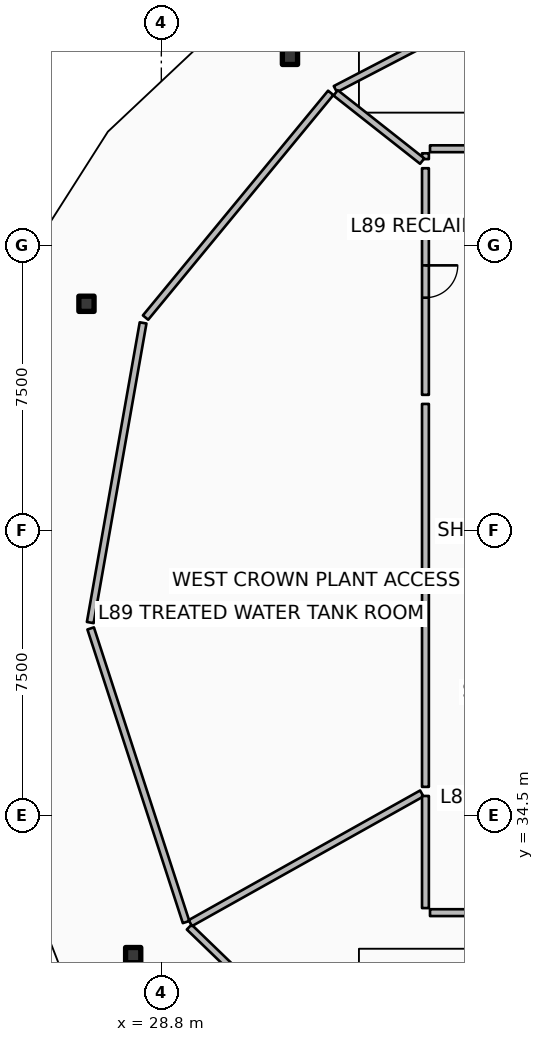
"""IFC4 building model, lengths in metres.
Left out: names, types, materials, properties, quantities, classifications, styles, units other than length and angle.
Written with IfcOpenShell. Run it as: python <this file> out.ifc"""

import sys

from ifc_helpers import new_model, si_unit, direction, frame, frame_2d, origin, origin_2d, place, context, subcontext, project, spatial, rectangle, hollow_rectangle, extrude, element, fill, save


model = new_model("IFC4")
c1 = context("Model", 3, precision=1e-05, world=origin(), true_north=direction((0.0, 1.0)))
c2 = subcontext(c1, "Body", "Model", "MODEL_VIEW")
j1 = project(units=[si_unit("LENGTHUNIT", "METRE"), si_unit("PLANEANGLEUNIT", "RADIAN")], contexts=[c1])
p1 = place(None, origin())
s1 = spatial("IfcSite", under=j1, at=p1, CompositionType="ELEMENT")
p2 = place(p1, origin())
s2 = spatial("IfcBuilding", under=s1, at=p2, CompositionType="ELEMENT")
p3 = place(p2, frame((0.0, 0.0, 356.0)))
s3 = spatial("IfcBuildingStorey", under=s2, at=p3, CompositionType="ELEMENT", Elevation=356.0)
for number, where, z_axis, x_axis in (
    (1, (32.185, 54.468, 0.0), (0.0, 0.0, 1.0), (1.0, 0.0, 0.0)),
    (2, (26.83, 47.97, 0.0), (0.0, 0.0, 1.0), (1.0, 0.0, 0.0)),
    (3, (28.059, 30.833, 0.0), (0.0, 0.0, 1.0), (1.0, 0.0, 0.0)),
):
    element("IfcColumn", number, at=place(p3, frame(where, z_axis=z_axis, x_axis=x_axis)), inside=s3, PredefinedType="COLUMN", context=c2, shape_type="SweptSolid", body=[
        extrude(hollow_rectangle(XDim=0.4, YDim=0.4, WallThickness=0.02, InnerFilletRadius=0.02, OuterFilletRadius=0.04, at=origin_2d()), origin(), (0.0, 0.0, 1.0), 3.32),
    ])
p4 = place(p3, frame((39.59, 56.853, 0.0), z_axis=(0.0, 0.0, 1.0), x_axis=(-0.886949494865, -0.461866423935, 0.0)))
e4 = element("IfcWall", 4, at=p4, inside=s3, PredefinedType="PARTITIONING", context=c2, shape_type="SweptSolid", body=[
    extrude(rectangle(XDim=7.002, YDim=0.18, at=frame_2d((3.501, 0.0))), origin(), (0.0, 0.0, 1.0), 2.76),
])
p5 = place(p3, frame((33.258, 53.52, 0.0), z_axis=(0.0, 0.0, 1.0), x_axis=(-0.636018833443, -0.771673534278, 0.0)))
e5 = element("IfcWall", 5, at=p5, inside=s3, PredefinedType="PARTITIONING", context=c2, shape_type="SweptSolid", body=[
    extrude(rectangle(XDim=7.661, YDim=0.18, at=frame_2d((3.831, 0.0))), origin(), (0.0, 0.0, 1.0), 2.76),
])
p6 = place(p3, frame((28.32, 47.468, 0.0), z_axis=(0.0, 0.0, 1.0), x_axis=(-0.173668776466, -0.984804120666, 0.0)))
e6 = element("IfcWall", 6, at=p6, inside=s3, PredefinedType="PARTITIONING", context=c2, shape_type="SweptSolid", body=[
    extrude(rectangle(XDim=8.006, YDim=0.18, at=frame_2d((4.003, 0.0))), origin(), (0.0, 0.0, 1.0), 2.76),
])
p7 = place(p3, frame((26.941, 39.428, 0.0), z_axis=(0.0, 0.0, 1.0), x_axis=(0.309024234991, -0.951054163646, 0.0)))
e7 = element("IfcWall", 7, at=p7, inside=s3, PredefinedType="PARTITIONING", context=c2, shape_type="SweptSolid", body=[
    extrude(rectangle(XDim=8.124, YDim=0.18, at=frame_2d((4.062, 0.0))), origin(), (0.0, 0.0, 1.0), 2.76),
])
p8 = place(p3, frame((29.533, 31.57, 0.0), z_axis=(0.0, 0.0, 1.0), x_axis=(0.719364153135, -0.694633151516, 0.0)))
e8 = element("IfcWall", 8, at=p8, inside=s3, PredefinedType="PARTITIONING", context=c2, shape_type="SweptSolid", body=[
    extrude(rectangle(XDim=8.006, YDim=0.18, at=frame_2d((4.003, 0.0))), origin(), (0.0, 0.0, 1.0), 2.76),
])
p9 = place(p3, frame((42.252, 52.05, 0.0), z_axis=(0.0, 0.0, 1.0), x_axis=(-1.0, 0.0, 0.0)))
e9 = element("IfcWall", 9, at=p9, inside=s3, PredefinedType="PARTITIONING", context=c2, shape_type="SweptSolid", body=[
    extrude(rectangle(XDim=6.382, YDim=0.18, at=frame_2d((3.191, 0.0))), origin(), (0.0, 0.0, 1.0), 2.76),
])
p10 = place(p9, frame((2.666, 0.0, 0.0)))
e10 = element("IfcOpeningElement", 10, at=p10, cuts=e9, PredefinedType="OPENING", context=c2, shape_type="SweptSolid", body=[
    extrude(rectangle(XDim=1.05, YDim=2.1, at=frame_2d((0.525, 1.05))), frame((0.0, 0.1, 0.0), z_axis=(0.0, -1.0, 0.0), x_axis=(1.0, 0.0, 0.0)), (0.0, 0.0, 1.0), 0.2),
])
p11 = place(p3, frame((35.75, 51.93, 0.0), z_axis=(0.0, 0.0, 1.0), x_axis=(0.0, -1.0, 0.0)))
e11 = element("IfcWall", 11, at=p11, inside=s3, PredefinedType="PARTITIONING", context=c2, shape_type="SweptSolid", body=[
    extrude(rectangle(XDim=0.153, YDim=0.18, at=frame_2d((0.076, 0.0))), origin(), (0.0, 0.0, 1.0), 2.76),
])
p12 = place(p3, frame((35.664, 51.725, 0.0), z_axis=(0.0, 0.0, 1.0), x_axis=(-0.78528570066, 0.619133562601, 0.0)))
e12 = element("IfcWall", 12, at=p12, inside=s3, PredefinedType="PARTITIONING", context=c2, shape_type="SweptSolid", body=[
    extrude(rectangle(XDim=2.899, YDim=0.18, at=frame_2d((1.45, 0.0))), origin(), (0.0, 0.0, 1.0), 2.76),
])
p13 = place(p3, frame((35.75, 51.537, 0.0), z_axis=(0.0, 0.0, 1.0), x_axis=(0.0, -1.0, 0.0)))
e13 = element("IfcWall", 13, at=p13, inside=s3, PredefinedType="PARTITIONING", context=c2, shape_type="SweptSolid", body=[
    extrude(rectangle(XDim=5.962, YDim=0.18, at=frame_2d((2.981, 0.0))), origin(), (0.0, 0.0, 1.0), 2.76),
])
p14 = place(p13, frame((2.556, 0.0, 0.0)))
e14 = element("IfcOpeningElement", 14, at=p14, cuts=e13, PredefinedType="OPENING", context=c2, shape_type="SweptSolid", body=[
    extrude(rectangle(XDim=0.85, YDim=2.06, at=frame_2d((0.425, 1.03))), frame((0.0, 0.1, 0.0), z_axis=(0.0, -1.0, 0.0), x_axis=(1.0, 0.0, 0.0)), (0.0, 0.0, 1.0), 0.2),
])
p15 = place(p3, frame((35.75, 45.335, 0.0), z_axis=(0.0, 0.0, 1.0), x_axis=(0.0, -1.0, 0.0)))
e15 = element("IfcWall", 15, at=p15, inside=s3, PredefinedType="PARTITIONING", context=c2, shape_type="SweptSolid", body=[
    extrude(rectangle(XDim=4.665, YDim=0.18, at=frame_2d((2.333, 0.0))), origin(), (0.0, 0.0, 1.0), 2.76),
])
p16 = place(p3, frame((35.75, 40.43, 0.0), z_axis=(0.0, 0.0, 1.0), x_axis=(0.0, -1.0, 0.0)))
e16 = element("IfcWall", 16, at=p16, inside=s3, PredefinedType="PARTITIONING", context=c2, shape_type="SweptSolid", body=[
    extrude(rectangle(XDim=5.17, YDim=0.18, at=frame_2d((2.585, 0.0))), origin(), (0.0, 0.0, 1.0), 2.76),
])
p17 = place(p3, frame((35.654, 35.086, 0.0), z_axis=(0.0, 0.0, 1.0), x_axis=(-0.872497667023, -0.488618277432, 0.0)))
e17 = element("IfcWall", 17, at=p17, inside=s3, PredefinedType="PARTITIONING", context=c2, shape_type="SweptSolid", body=[
    extrude(rectangle(XDim=6.981, YDim=0.18, at=frame_2d((3.491, 0.0))), origin(), (0.0, 0.0, 1.0), 2.76),
])
p18 = place(p3, frame((35.75, 35.02, 0.0), z_axis=(0.0, 0.0, 1.0), x_axis=(0.0, -1.0, 0.0)))
e18 = element("IfcWall", 18, at=p18, inside=s3, PredefinedType="PARTITIONING", context=c2, shape_type="SweptSolid", body=[
    extrude(rectangle(XDim=2.95, YDim=0.18, at=frame_2d((1.475, 0.0))), origin(), (0.0, 0.0, 1.0), 2.76),
])
p19 = place(p3, frame((35.87, 31.95, 0.0), z_axis=(0.0, 0.0, 1.0), x_axis=(1.0, 0.0, 0.0)))
e19 = element("IfcWall", 19, at=p19, inside=s3, PredefinedType="PARTITIONING", context=c2, shape_type="SweptSolid", body=[
    extrude(rectangle(XDim=4.087, YDim=0.18, at=frame_2d((2.043, 0.0))), origin(), (0.0, 0.0, 1.0), 2.76),
])
p20 = place(p14, origin())
e20 = element("IfcDoor", 20, at=p20, inside=s3, OperationType="SINGLE_SWING_LEFT", PredefinedType="DOOR", context=c2, shape_type="SweptSolid", body=[
    extrude(rectangle(XDim=0.85, YDim=2.06, at=frame_2d((0.425, 1.03))), frame((0.0, 0.025, 0.0), z_axis=(0.0, -1.0, 0.0), x_axis=(1.0, 0.0, 0.0)), (0.0, 0.0, 1.0), 0.05),
])
fill(e14, e20)
save(model, sys.argv[1])
